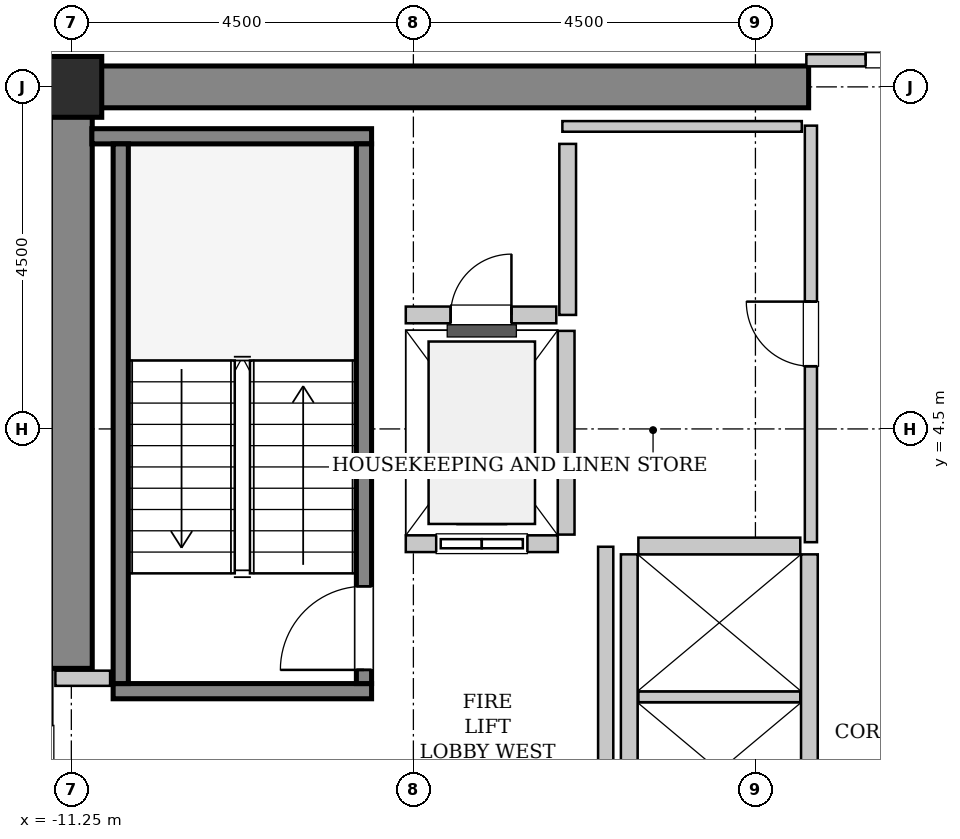
"""IFC4 building model, lengths in metres.
Left out: names, types, materials, properties, quantities, classifications, styles, units other than length and angle.
Written with IfcOpenShell. Run it as: python <this file> out.ifc"""

import sys

from ifc_helpers import new_model, si_unit, direction, frame, frame_2d, origin, origin_2d, place, context, subcontext, project, spatial, rectangle, hollow_rectangle, extrude, source, transform, mapped, element, fill, save


model = new_model("IFC4")
c1 = context("Model", 3, precision=1e-05, world=origin(), true_north=direction((0.0, 1.0)))
c2 = subcontext(c1, "Body", "Model", "MODEL_VIEW")
j1 = project(units=[si_unit("LENGTHUNIT", "METRE"), si_unit("PLANEANGLEUNIT", "RADIAN")], contexts=[c1])
p1 = place(None, origin())
s1 = spatial("IfcSite", under=j1, at=p1, CompositionType="ELEMENT")
p2 = place(p1, origin())
s2 = spatial("IfcBuilding", under=s1, at=p2, CompositionType="ELEMENT")
p3 = place(p2, frame((0.0, 0.0, 190.6)))
s3 = spatial("IfcBuildingStorey", under=s2, at=p3, CompositionType="ELEMENT", Elevation=190.6)
m1 = source(origin(), c2, "Body", "SweptSolid", [
    extrude(rectangle(XDim=9.975, YDim=0.55, at=frame_2d((4.987, 0.0))), origin(), (0.0, 0.0, 1.0), 3.8),
])
p4 = place(p3, frame((-11.525, 9.0, 0.0), z_axis=(0.0, 0.0, 1.0), x_axis=(1.0, 0.0, 0.0)))
e1 = element("IfcWall", 1, at=p4, inside=s3, PredefinedType="SHEAR", context=c2, shape_type="MappedRepresentation", body=[
    mapped(m1, transform((0.0, 0.0, 0.0), x_axis=(1.0, 0.0, 0.0), y_axis=(0.0, 1.0, 0.0), z_axis=(0.0, 0.0, 1.0), scale=1.0)),
])
m2 = source(origin(), c2, "Body", "SweptSolid", [
    extrude(rectangle(XDim=7.375, YDim=0.55, at=frame_2d((3.688, 0.0))), origin(), (0.0, 0.0, 1.0), 3.8),
])
p5 = place(p3, frame((-11.25, 1.35, 0.0), z_axis=(0.0, 0.0, 1.0), x_axis=(0.0, 1.0, 0.0)))
e2 = element("IfcWall", 2, at=p5, inside=s3, PredefinedType="SHEAR", context=c2, shape_type="MappedRepresentation", body=[
    mapped(m2, transform((0.0, 0.0, 0.0), x_axis=(1.0, 0.0, 0.0), y_axis=(0.0, 1.0, 0.0), z_axis=(0.0, 0.0, 1.0), scale=1.0)),
])
m3 = source(origin(), c2, "Body", "SweptSolid", [
    extrude(hollow_rectangle(XDim=0.8, YDim=0.8, WallThickness=0.04, InnerFilletRadius=0.04, OuterFilletRadius=0.08, at=origin_2d()), origin(), (0.0, 0.0, 1.0), 3.8),
])
p6 = place(p3, frame((-11.25, 9.0, 0.0), z_axis=(0.0, 0.0, 1.0), x_axis=(1.0, 0.0, 0.0)))
e3 = element("IfcColumn", 3, at=p6, inside=s3, PredefinedType="COLUMN", context=c2, shape_type="MappedRepresentation", body=[
    mapped(m3, transform((0.0, 0.0, 0.0), x_axis=(1.0, 0.0, 0.0), y_axis=(0.0, 1.0, 0.0), z_axis=(0.0, 0.0, 1.0), scale=1.0)),
])
m4 = source(origin(), c2, "Body", "SweptSolid", [
    extrude(rectangle(XDim=3.4, YDim=0.2, at=frame_2d((1.7, 0.0))), origin(), (0.0, 0.0, 1.0), 3.8),
])
p7 = place(p3, frame((-7.3, 1.05, 0.0), z_axis=(0.0, 0.0, 1.0), x_axis=(-1.0, 0.0, 0.0)))
e4 = element("IfcWall", 4, at=p7, inside=s3, PredefinedType="SOLIDWALL", context=c2, shape_type="MappedRepresentation", body=[
    mapped(m4, transform((0.0, 0.0, 0.0), x_axis=(1.0, 0.0, 0.0), y_axis=(0.0, 1.0, 0.0), z_axis=(0.0, 0.0, 1.0), scale=1.0)),
])
m5 = source(origin(), c2, "Body", "SweptSolid", [
    extrude(rectangle(XDim=3.68, YDim=0.2, at=frame_2d((1.84, 0.0))), origin(), (0.0, 0.0, 1.0), 3.8),
])
p8 = place(p3, frame((-7.3, 8.35, 0.0), z_axis=(0.0, 0.0, 1.0), x_axis=(-1.0, 0.0, 0.0)))
e5 = element("IfcWall", 5, at=p8, inside=s3, PredefinedType="SOLIDWALL", context=c2, shape_type="MappedRepresentation", body=[
    mapped(m5, transform((0.0, 0.0, 0.0), x_axis=(1.0, 0.0, 0.0), y_axis=(0.0, 1.0, 0.0), z_axis=(0.0, 0.0, 1.0), scale=1.0)),
])
m6 = source(origin(), c2, "Body", "SweptSolid", [
    extrude(rectangle(XDim=7.1, YDim=0.2, at=frame_2d((3.55, 0.0))), origin(), (0.0, 0.0, 1.0), 3.8),
])
p9 = place(p3, frame((-7.4, 1.15, 0.0), z_axis=(0.0, 0.0, 1.0), x_axis=(0.0, 1.0, 0.0)))
e6 = element("IfcWall", 6, at=p9, inside=s3, PredefinedType="SOLIDWALL", context=c2, shape_type="MappedRepresentation", body=[
    mapped(m6, transform((0.0, 0.0, 0.0), x_axis=(1.0, 0.0, 0.0), y_axis=(0.0, 1.0, 0.0), z_axis=(0.0, 0.0, 1.0), scale=1.0)),
])
p10 = place(p9, frame((0.18, 0.0, 0.0)))
e7 = element("IfcOpeningElement", 7, at=p10, cuts=e6, PredefinedType="OPENING", context=c2, shape_type="SweptSolid", body=[
    extrude(rectangle(XDim=1.1, YDim=2.15, at=frame_2d((0.55, 1.075))), frame((0.0, 0.11, 0.0), z_axis=(0.0, -1.0, 0.0), x_axis=(1.0, 0.0, 0.0)), (0.0, 0.0, 1.0), 0.22),
])
p11 = place(p3, frame((-10.6, 1.15, 0.0), z_axis=(0.0, 0.0, 1.0), x_axis=(0.0, 1.0, 0.0)))
e8 = element("IfcWall", 8, at=p11, inside=s3, PredefinedType="SOLIDWALL", context=c2, shape_type="MappedRepresentation", body=[
    mapped(m6, transform((0.0, 0.0, 0.0), x_axis=(1.0, 0.0, 0.0), y_axis=(0.0, 1.0, 0.0), z_axis=(0.0, 0.0, 1.0), scale=1.0)),
])
m7 = source(origin(), c2, "Body", "SweptSolid", [
    extrude(rectangle(XDim=2.0, YDim=0.22, at=frame_2d((1.0, 0.0))), origin(), (0.0, 0.0, 1.0), 3.535),
])
p12 = place(p3, frame((-6.85, 2.99, 0.0), z_axis=(0.0, 0.0, 1.0), x_axis=(1.0, 0.0, 0.0)))
e9 = element("IfcWall", 9, at=p12, inside=s3, PredefinedType="SOLIDWALL", context=c2, shape_type="MappedRepresentation", body=[
    mapped(m7, transform((0.0, 0.0, 0.0), x_axis=(1.0, 0.0, 0.0), y_axis=(0.0, 1.0, 0.0), z_axis=(0.0, 0.0, 1.0), scale=1.0)),
])
p13 = place(p12, frame((0.4, 0.0, 0.0)))
e10 = element("IfcOpeningElement", 10, at=p13, cuts=e9, PredefinedType="OPENING", context=c2, shape_type="SweptSolid", body=[
    extrude(rectangle(XDim=1.2, YDim=2.2, at=frame_2d((0.6, 1.1))), frame((0.0, 0.12, 0.0), z_axis=(0.0, -1.0, 0.0), x_axis=(1.0, 0.0, 0.0)), (0.0, 0.0, 1.0), 0.24),
])
m8 = source(origin(), c2, "Body", "SweptSolid", [
    extrude(rectangle(XDim=2.68, YDim=0.22, at=frame_2d((1.34, 0.0))), origin(), (0.0, 0.0, 1.0), 3.535),
])
p14 = place(p3, frame((-4.74, 3.11, 0.0), z_axis=(0.0, 0.0, 1.0), x_axis=(0.0, 1.0, 0.0)))
e11 = element("IfcWall", 11, at=p14, inside=s3, PredefinedType="SOLIDWALL", context=c2, shape_type="MappedRepresentation", body=[
    mapped(m8, transform((0.0, 0.0, 0.0), x_axis=(1.0, 0.0, 0.0), y_axis=(0.0, 1.0, 0.0), z_axis=(0.0, 0.0, 1.0), scale=1.0)),
])
m9 = source(origin(), c2, "Body", "SweptSolid", [
    extrude(rectangle(XDim=5.7, YDim=0.22, at=frame_2d((2.85, 0.0))), origin(), (0.0, 0.0, 1.0), 3.535),
])
for number, where, z_axis, x_axis in (
    (12, (-1.54, -2.85, 0.0), (0.0, 0.0, 1.0), (0.0, 1.0, 0.0)),
    (13, (-3.91, 2.85, 0.0), (0.0, 0.0, 1.0), (0.0, -1.0, 0.0)),
):
    element("IfcWall", number, at=place(p3, frame(where, z_axis=z_axis, x_axis=x_axis)), inside=s3, PredefinedType="SOLIDWALL", context=c2, shape_type="MappedRepresentation", body=[
        mapped(m9, transform((0.0, 0.0, 0.0), x_axis=(1.0, 0.0, 0.0), y_axis=(0.0, 1.0, 0.0), z_axis=(0.0, 0.0, 1.0), scale=1.0)),
    ])
m10 = source(origin(), c2, "Body", "SweptSolid", [
    extrude(rectangle(XDim=2.13, YDim=0.14, at=frame_2d((1.065, 0.0))), origin(), (0.0, 0.0, 1.0), 3.535),
])
p15 = place(p3, frame((-3.79, 0.975, 0.0), z_axis=(0.0, 0.0, 1.0), x_axis=(1.0, 0.0, 0.0)))
e14 = element("IfcWall", 14, at=p15, inside=s3, PredefinedType="PARTITIONING", context=c2, shape_type="MappedRepresentation", body=[
    mapped(m10, transform((0.0, 0.0, 0.0), x_axis=(1.0, 0.0, 0.0), y_axis=(0.0, 1.0, 0.0), z_axis=(0.0, 0.0, 1.0), scale=1.0)),
])
m11 = source(origin(), c2, "Body", "SweptSolid", [
    extrude(rectangle(XDim=2.13, YDim=0.22, at=frame_2d((1.065, 0.0))), origin(), (0.0, 0.0, 1.0), 3.535),
])
p16 = place(p3, frame((-1.66, 2.96, 0.0), z_axis=(0.0, 0.0, 1.0), x_axis=(-1.0, 0.0, 0.0)))
e15 = element("IfcWall", 15, at=p16, inside=s3, PredefinedType="SOLIDWALL", context=c2, shape_type="MappedRepresentation", body=[
    mapped(m11, transform((0.0, 0.0, 0.0), x_axis=(1.0, 0.0, 0.0), y_axis=(0.0, 1.0, 0.0), z_axis=(0.0, 0.0, 1.0), scale=1.0)),
])
m12 = source(origin(), c2, "Body", "SweptSolid", [
    extrude(rectangle(XDim=2.25, YDim=0.22, at=frame_2d((1.125, 0.0))), origin(), (0.0, 0.0, 1.0), 3.535),
])
p17 = place(p3, frame((-4.72, 6.0, 0.0), z_axis=(0.0, 0.0, 1.0), x_axis=(0.0, 1.0, 0.0)))
e16 = element("IfcWall", 16, at=p17, inside=s3, PredefinedType="SOLIDWALL", context=c2, shape_type="MappedRepresentation", body=[
    mapped(m12, transform((0.0, 0.0, 0.0), x_axis=(1.0, 0.0, 0.0), y_axis=(0.0, 1.0, 0.0), z_axis=(0.0, 0.0, 1.0), scale=1.0)),
])
m13 = source(origin(), c2, "Body", "SweptSolid", [
    extrude(rectangle(XDim=1.98, YDim=0.22, at=frame_2d((0.99, 0.0))), origin(), (0.0, 0.0, 1.0), 3.535),
])
p18 = place(p3, frame((-6.85, 6.0, 0.0), z_axis=(0.0, 0.0, 1.0), x_axis=(1.0, 0.0, 0.0)))
e17 = element("IfcWall", 17, at=p18, inside=s3, PredefinedType="SOLIDWALL", context=c2, shape_type="MappedRepresentation", body=[
    mapped(m13, transform((0.0, 0.0, 0.0), x_axis=(1.0, 0.0, 0.0), y_axis=(0.0, 1.0, 0.0), z_axis=(0.0, 0.0, 1.0), scale=1.0)),
])
p19 = place(p18, frame((0.59, 0.0, 0.0)))
e18 = element("IfcOpeningElement", 18, at=p19, cuts=e17, PredefinedType="OPENING", context=c2, shape_type="SweptSolid", body=[
    extrude(rectangle(XDim=0.8, YDim=2.0, at=frame_2d((0.4, 1.0))), frame((0.0, 0.12, 0.0), z_axis=(0.0, -1.0, 0.0), x_axis=(1.0, 0.0, 0.0)), (0.0, 0.0, 1.0), 0.24),
])
m14 = source(origin(), c2, "Body", "SweptSolid", [
    extrude(rectangle(XDim=5.9, YDim=0.2, at=frame_2d((2.95, 0.0))), origin(), (0.0, 0.0, 1.0), 3.535),
])
p20 = place(p3, frame((-4.22, -2.95, 0.0), z_axis=(0.0, 0.0, 1.0), x_axis=(0.0, 1.0, 0.0)))
e19 = element("IfcWall", 19, at=p20, inside=s3, PredefinedType="PARTITIONING", context=c2, shape_type="MappedRepresentation", body=[
    mapped(m14, transform((0.0, 0.0, 0.0), x_axis=(1.0, 0.0, 0.0), y_axis=(0.0, 1.0, 0.0), z_axis=(0.0, 0.0, 1.0), scale=1.0)),
])
m15 = source(origin(), c2, "Body", "SweptSolid", [
    extrude(rectangle(XDim=0.72, YDim=0.2, at=frame_2d((0.36, 0.0))), origin(), (0.0, 0.0, 1.0), 3.535),
])
p21 = place(p3, frame((-11.46, 1.22, 0.0), z_axis=(0.0, 0.0, 1.0), x_axis=(1.0, 0.0, 0.0)))
e20 = element("IfcWall", 20, at=p21, inside=s3, PredefinedType="PARTITIONING", context=c2, shape_type="MappedRepresentation", body=[
    mapped(m15, transform((0.0, 0.0, 0.0), x_axis=(1.0, 0.0, 0.0), y_axis=(0.0, 1.0, 0.0), z_axis=(0.0, 0.0, 1.0), scale=1.0)),
])
m16 = source(origin(), c2, "Body", "SweptSolid", [
    extrude(rectangle(XDim=3.16, YDim=0.16, at=frame_2d((1.58, 0.0))), origin(), (0.0, 0.0, 1.0), 2.425),
])
p22 = place(p3, frame((-1.58, 9.35, 0.0), z_axis=(0.0, 0.0, 1.0), x_axis=(1.0, 0.0, 0.0)))
e21 = element("IfcWall", 21, at=p22, inside=s3, PredefinedType="PARTITIONING", context=c2, shape_type="MappedRepresentation", body=[
    mapped(m16, transform((0.0, 0.0, 0.0), x_axis=(1.0, 0.0, 0.0), y_axis=(0.0, 1.0, 0.0), z_axis=(0.0, 0.0, 1.0), scale=1.0)),
])
p23 = place(p22, frame((0.78, 0.0, 0.0)))
e22 = element("IfcOpeningElement", 22, at=p23, cuts=e21, PredefinedType="OPENING", context=c2, shape_type="SweptSolid", body=[
    extrude(rectangle(XDim=1.6, YDim=2.3, at=frame_2d((0.8, 1.15))), frame((0.0, 0.09, 0.0), z_axis=(0.0, -1.0, 0.0), x_axis=(1.0, 0.0, 0.0)), (0.0, 0.0, 1.0), 0.18),
])
m17 = source(origin(), c2, "Body", "SweptSolid", [
    extrude(rectangle(XDim=5.48, YDim=0.16, at=frame_2d((2.74, 0.0))), origin(), (0.0, 0.0, 1.0), 3.535),
])
p24 = place(p3, frame((-1.52, 3.01, 0.0), z_axis=(0.0, 0.0, 1.0), x_axis=(0.0, 1.0, 0.0)))
e23 = element("IfcWall", 23, at=p24, inside=s3, PredefinedType="PARTITIONING", context=c2, shape_type="MappedRepresentation", body=[
    mapped(m17, transform((0.0, 0.0, 0.0), x_axis=(1.0, 0.0, 0.0), y_axis=(0.0, 1.0, 0.0), z_axis=(0.0, 0.0, 1.0), scale=1.0)),
])
p25 = place(p24, frame((2.315, 0.0, 0.0)))
e24 = element("IfcOpeningElement", 24, at=p25, cuts=e23, PredefinedType="OPENING", context=c2, shape_type="SweptSolid", body=[
    extrude(rectangle(XDim=0.85, YDim=2.1, at=frame_2d((0.425, 1.05))), frame((0.0, 0.09, 0.0), z_axis=(0.0, -1.0, 0.0), x_axis=(1.0, 0.0, 0.0)), (0.0, 0.0, 1.0), 0.18),
])
m18 = source(origin(), c2, "Body", "SweptSolid", [
    extrude(rectangle(XDim=3.15, YDim=0.14, at=frame_2d((1.575, 0.0))), origin(), (0.0, 0.0, 1.0), 3.535),
])
p26 = place(p3, frame((-4.79, 8.48, 0.0), z_axis=(0.0, 0.0, 1.0), x_axis=(1.0, 0.0, 0.0)))
e25 = element("IfcWall", 25, at=p26, inside=s3, PredefinedType="PARTITIONING", context=c2, shape_type="MappedRepresentation", body=[
    mapped(m18, transform((0.0, 0.0, 0.0), x_axis=(1.0, 0.0, 0.0), y_axis=(0.0, 1.0, 0.0), z_axis=(0.0, 0.0, 1.0), scale=1.0)),
])
m19 = source(origin(), c2, "Body", "SweptSolid", [
    extrude(rectangle(XDim=1.1, YDim=2.15, at=frame_2d((0.55, 1.075))), frame((0.0, 0.025, 0.0), z_axis=(0.0, -1.0, 0.0), x_axis=(1.0, 0.0, 0.0)), (0.0, 0.0, 1.0), 0.05),
])
p27 = place(p10, origin())
e26 = element("IfcDoor", 26, at=p27, inside=s3, OperationType="SINGLE_SWING_LEFT", PredefinedType="DOOR", context=c2, shape_type="MappedRepresentation", body=[
    mapped(m19, transform((0.0, 0.0, 0.0), x_axis=(1.0, 0.0, 0.0), y_axis=(0.0, 1.0, 0.0), z_axis=(0.0, 0.0, 1.0), scale=1.0)),
])
fill(e7, e26)
m20 = source(origin(), c2, "Body", "SweptSolid", [
    extrude(rectangle(XDim=1.2, YDim=2.2, at=frame_2d((0.6, 1.1))), frame((0.0, 0.025, 0.0), z_axis=(0.0, -1.0, 0.0), x_axis=(1.0, 0.0, 0.0)), (0.0, 0.0, 1.0), 0.05),
])
p28 = place(p13, origin())
e27 = element("IfcDoor", 27, at=p28, inside=s3, OperationType="SLIDING_TO_LEFT", PredefinedType="DOOR", context=c2, shape_type="MappedRepresentation", body=[
    mapped(m20, transform((0.0, 0.0, 0.0), x_axis=(1.0, 0.0, 0.0), y_axis=(0.0, 1.0, 0.0), z_axis=(0.0, 0.0, 1.0), scale=1.0)),
])
fill(e10, e27)
m21 = source(origin(), c2, "Body", "SweptSolid", [
    extrude(rectangle(XDim=0.8, YDim=2.0, at=frame_2d((0.4, 1.0))), frame((0.0, 0.025, 0.0), z_axis=(0.0, -1.0, 0.0), x_axis=(1.0, 0.0, 0.0)), (0.0, 0.0, 1.0), 0.05),
])
p29 = place(p19, origin())
e28 = element("IfcDoor", 28, at=p29, inside=s3, OperationType="SINGLE_SWING_RIGHT", PredefinedType="TRAPDOOR", context=c2, shape_type="MappedRepresentation", body=[
    mapped(m21, transform((0.0, 0.0, 0.0), x_axis=(1.0, 0.0, 0.0), y_axis=(0.0, 1.0, 0.0), z_axis=(0.0, 0.0, 1.0), scale=1.0)),
])
fill(e18, e28)
m22 = source(origin(), c2, "Body", "SweptSolid", [
    extrude(rectangle(XDim=1.6, YDim=2.3, at=frame_2d((0.8, 1.15))), frame((0.0, 0.025, 0.0), z_axis=(0.0, -1.0, 0.0), x_axis=(1.0, 0.0, 0.0)), (0.0, 0.0, 1.0), 0.05),
])
p30 = place(p23, origin())
e29 = element("IfcDoor", 29, at=p30, inside=s3, OperationType="DOUBLE_DOOR_SINGLE_SWING", PredefinedType="DOOR", context=c2, shape_type="MappedRepresentation", body=[
    mapped(m22, transform((0.0, 0.0, 0.0), x_axis=(1.0, 0.0, 0.0), y_axis=(0.0, 1.0, 0.0), z_axis=(0.0, 0.0, 1.0), scale=1.0)),
])
fill(e22, e29)
m23 = source(origin(), c2, "Body", "SweptSolid", [
    extrude(rectangle(XDim=0.85, YDim=2.1, at=frame_2d((0.425, 1.05))), frame((0.0, 0.025, 0.0), z_axis=(0.0, -1.0, 0.0), x_axis=(1.0, 0.0, 0.0)), (0.0, 0.0, 1.0), 0.05),
])
p31 = place(p25, origin())
e30 = element("IfcDoor", 30, at=p31, inside=s3, OperationType="SINGLE_SWING_RIGHT", PredefinedType="DOOR", context=c2, shape_type="MappedRepresentation", body=[
    mapped(m23, transform((0.0, 0.0, 0.0), x_axis=(1.0, 0.0, 0.0), y_axis=(0.0, 1.0, 0.0), z_axis=(0.0, 0.0, 1.0), scale=1.0)),
])
fill(e24, e30)
save(model, sys.argv[1])
